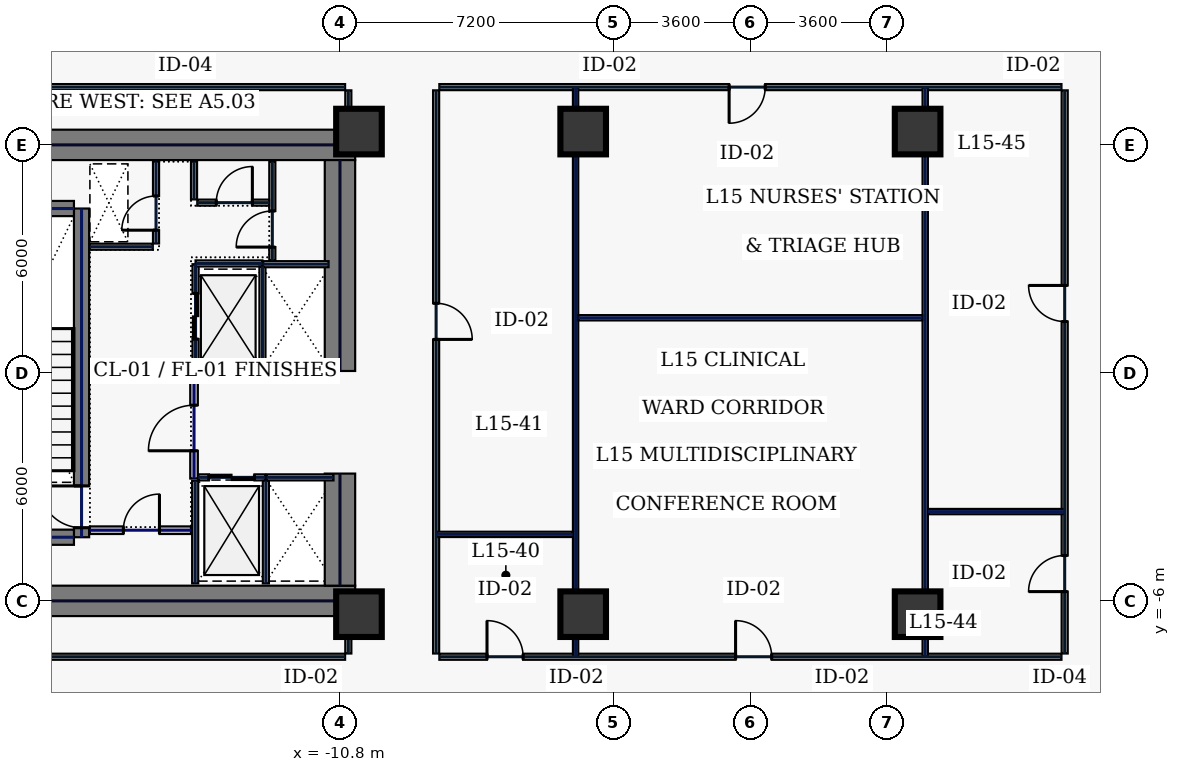
"""IFC4 building model, lengths in metres.
Left out: names, types, materials, properties, quantities, classifications, styles, units other than length and angle.
Written with IfcOpenShell. Run it as: python <this file> out.ifc"""

import sys

from ifc_helpers import new_model, si_unit, direction, frame, frame_2d, origin, origin_2d, place, context, subcontext, project, spatial, rectangle, hollow_rectangle, extrude, element, fill, save


model = new_model("IFC4")
c1 = context("Model", 3, precision=1e-05, world=origin(), true_north=direction((0.0, 1.0)))
c2 = subcontext(c1, "Body", "Model", "MODEL_VIEW")
j1 = project(units=[si_unit("LENGTHUNIT", "METRE"), si_unit("PLANEANGLEUNIT", "RADIAN")], contexts=[c1])
p1 = place(None, origin())
s1 = spatial("IfcSite", under=j1, at=p1, CompositionType="ELEMENT")
p2 = place(p1, origin())
s2 = spatial("IfcBuilding", under=s1, at=p2, CompositionType="ELEMENT")
p3 = place(p2, frame((0.0, 0.0, 71.4)))
s3 = spatial("IfcBuildingStorey", under=s2, at=p3, CompositionType="ELEMENT", Elevation=71.4)
for number, where, z_axis, x_axis in (
    (1, (-22.0, 6.0, 0.0), (0.0, 0.0, 1.0), (1.0, 0.0, 0.0)),
    (2, (-22.0, -6.0, 0.0), (0.0, 0.0, 1.0), (1.0, 0.0, 0.0)),
):
    element("IfcWall", number, at=place(p3, frame(where, z_axis=z_axis, x_axis=x_axis)), inside=s3, PredefinedType="SHEAR", context=c2, shape_type="SweptSolid", body=[
        extrude(rectangle(XDim=11.6, YDim=0.8, at=frame_2d((5.8, 0.0))), origin(), (0.0, 0.0, 1.0), 3.74),
    ])
p4 = place(p3, frame((-10.8, -5.6, 0.0), z_axis=(0.0, 0.0, 1.0), x_axis=(0.0, 1.0, 0.0)))
e3 = element("IfcWall", 3, at=p4, inside=s3, PredefinedType="SHEAR", context=c2, shape_type="SweptSolid", body=[
    extrude(rectangle(XDim=2.95, YDim=0.8, at=frame_2d((1.475, 0.0))), origin(), (0.0, 0.0, 1.0), 3.74),
])
p5 = place(p3, frame((-10.8, 0.05, 0.0), z_axis=(0.0, 0.0, 1.0), x_axis=(0.0, 1.0, 0.0)))
e4 = element("IfcWall", 4, at=p5, inside=s3, PredefinedType="SHEAR", context=c2, shape_type="SweptSolid", body=[
    extrude(rectangle(XDim=5.55, YDim=0.8, at=frame_2d((2.775, 0.0))), origin(), (0.0, 0.0, 1.0), 3.74),
])
p6 = place(p3, frame((-17.6, -4.325, 0.0), z_axis=(0.0, 0.0, 1.0), x_axis=(0.0, 1.0, 0.0)))
e5 = element("IfcWall", 5, at=p6, inside=s3, PredefinedType="SHEAR", context=c2, shape_type="SweptSolid", body=[
    extrude(rectangle(XDim=8.65, YDim=0.4, at=frame_2d((4.325, 0.0))), origin(), (0.0, 0.0, 1.0), 3.74),
])
p7 = place(p6, frame((0.25, 0.0, 0.0)))
e6 = element("IfcOpeningElement", 6, at=p7, cuts=e5, PredefinedType="OPENING", context=c2, shape_type="SweptSolid", body=[
    extrude(rectangle(XDim=1.1, YDim=2.2, at=frame_2d((0.55, 1.1))), frame((0.0, 0.21, 0.0), z_axis=(0.0, -1.0, 0.0), x_axis=(1.0, 0.0, 0.0)), (0.0, 0.0, 1.0), 0.42),
])
for number, where, z_axis, x_axis in (
    (7, (-21.2, -4.325, 0.0), (0.0, 0.0, 1.0), (1.0, 0.0, 0.0)),
    (8, (-21.2, 4.325, 0.0), (0.0, 0.0, 1.0), (1.0, 0.0, 0.0)),
):
    element("IfcWall", number, at=place(p3, frame(where, z_axis=z_axis, x_axis=x_axis)), inside=s3, PredefinedType="SHEAR", context=c2, shape_type="SweptSolid", body=[
        extrude(rectangle(XDim=3.4, YDim=0.4, at=frame_2d((1.7, 0.0))), origin(), (0.0, 0.0, 1.0), 3.74),
    ])
for number, where, z_axis, x_axis in (
    (9, (-10.3, -6.35, 0.0), (0.0, 0.0, 1.0), (1.0, 0.0, 0.0)),
    (10, (-10.3, 6.35, 0.0), (0.0, 0.0, 1.0), (1.0, 0.0, 0.0)),
    (11, (-4.4, -6.35, 0.0), (0.0, 0.0, 1.0), (1.0, 0.0, 0.0)),
    (12, (4.4, -6.35, 0.0), (0.0, 0.0, 1.0), (1.0, 0.0, 0.0)),
    (13, (-4.4, 6.35, 0.0), (0.0, 0.0, 1.0), (1.0, 0.0, 0.0)),
    (14, (4.4, 6.35, 0.0), (0.0, 0.0, 1.0), (1.0, 0.0, 0.0)),
):
    element("IfcColumn", number, at=place(p3, frame(where, z_axis=z_axis, x_axis=x_axis)), inside=s3, PredefinedType="COLUMN", context=c2, shape_type="SweptSolid", body=[
        extrude(hollow_rectangle(XDim=1.2, YDim=1.2, WallThickness=0.05, at=origin_2d()), origin(), (0.0, 0.0, 1.0), 3.74),
    ])
p8 = place(p3, frame((-14.6, 0.12, 0.0), z_axis=(0.0, 0.0, 1.0), x_axis=(0.0, 1.0, 0.0)))
e15 = element("IfcWall", 15, at=p8, inside=s3, PredefinedType="PARTITIONING", context=c2, shape_type="SweptSolid", body=[
    extrude(rectangle(XDim=2.74, YDim=0.16, at=frame_2d((1.37, 0.0))), origin(), (0.0, 0.0, 1.0), 3.74),
])
p9 = place(p8, frame((0.77, 0.0, 0.0)))
e16 = element("IfcOpeningElement", 16, at=p9, cuts=e15, PredefinedType="OPENING", context=c2, shape_type="SweptSolid", body=[
    extrude(rectangle(XDim=1.2, YDim=2.2, at=frame_2d((0.6, 1.1))), frame((0.0, 0.09, 0.0), z_axis=(0.0, -1.0, 0.0), x_axis=(1.0, 0.0, 0.0)), (0.0, 0.0, 1.0), 0.18),
])
for number, where, z_axis, x_axis in (
    (17, (-14.6, 0.1, 0.0), (0.0, 0.0, 1.0), (1.0, 0.0, 0.0)),
    (18, (-14.6, 2.88, 0.0), (0.0, 0.0, 1.0), (1.0, 0.0, 0.0)),
):
    element("IfcWall", number, at=place(p3, frame(where, z_axis=z_axis, x_axis=x_axis)), inside=s3, PredefinedType="PARTITIONING", context=c2, shape_type="SweptSolid", body=[
        extrude(rectangle(XDim=1.76, YDim=0.16, at=frame_2d((0.88, 0.0))), origin(), (0.0, 0.0, 1.0), 3.74),
    ])
p10 = place(p3, frame((-12.84, 0.18, 0.0), z_axis=(0.0, 0.0, 1.0), x_axis=(0.0, 1.0, 0.0)))
e19 = element("IfcWall", 19, at=p10, inside=s3, PredefinedType="PARTITIONING", context=c2, shape_type="SweptSolid", body=[
    extrude(rectangle(XDim=2.62, YDim=0.16, at=frame_2d((1.31, 0.0))), origin(), (0.0, 0.0, 1.0), 3.74),
])
p11 = place(p3, frame((-14.53, -2.75, 0.0), z_axis=(0.0, 0.0, 1.0), x_axis=(1.0, 0.0, 0.0)))
e20 = element("IfcWall", 20, at=p11, inside=s3, PredefinedType="PARTITIONING", context=c2, shape_type="SweptSolid", body=[
    extrude(rectangle(XDim=1.76, YDim=0.16, at=frame_2d((0.88, 0.0))), origin(), (0.0, 0.0, 1.0), 3.74),
])
p12 = place(p11, frame((0.28, 0.0, 0.0)))
e21 = element("IfcOpeningElement", 21, at=p12, cuts=e20, PredefinedType="OPENING", context=c2, shape_type="SweptSolid", body=[
    extrude(rectangle(XDim=1.2, YDim=2.2, at=frame_2d((0.6, 1.1))), frame((0.0, 0.09, 0.0), z_axis=(0.0, -1.0, 0.0), x_axis=(1.0, 0.0, 0.0)), (0.0, 0.0, 1.0), 0.18),
])
for number, where, z_axis, x_axis in (
    (22, (-12.75, -5.54, 0.0), (0.0, 0.0, 1.0), (0.0, 1.0, 0.0)),
    (23, (-14.61, -5.54, 0.0), (0.0, 0.0, 1.0), (0.0, 1.0, 0.0)),
):
    element("IfcWall", number, at=place(p3, frame(where, z_axis=z_axis, x_axis=x_axis)), inside=s3, PredefinedType="PARTITIONING", context=c2, shape_type="SweptSolid", body=[
        extrude(rectangle(XDim=2.7, YDim=0.16, at=frame_2d((1.35, 0.0))), origin(), (0.0, 0.0, 1.0), 3.74),
    ])
p13 = place(p3, frame((-12.73, -2.75, 0.0), z_axis=(0.0, 0.0, 1.0), x_axis=(1.0, 0.0, 0.0)))
e24 = element("IfcWall", 24, at=p13, inside=s3, PredefinedType="PARTITIONING", context=c2, shape_type="SweptSolid", body=[
    extrude(rectangle(XDim=1.76, YDim=0.16, at=frame_2d((0.88, 0.0))), origin(), (0.0, 0.0, 1.0), 3.74),
])
for number, where, z_axis, x_axis in (
    (25, (-12.82, 0.06, 0.0), (0.0, 0.0, 1.0), (1.0, 0.0, 0.0)),
    (26, (-12.82, 2.86, 0.0), (0.0, 0.0, 1.0), (1.0, 0.0, 0.0)),
):
    element("IfcWall", number, at=place(p3, frame(where, z_axis=z_axis, x_axis=x_axis)), inside=s3, PredefinedType="PARTITIONING", context=c2, shape_type="SweptSolid", body=[
        extrude(rectangle(XDim=1.72, YDim=0.16, at=frame_2d((0.86, 0.0))), origin(), (0.0, 0.0, 1.0), 3.74),
    ])
p14 = place(p3, frame((-15.64, 3.405, 0.0), z_axis=(0.0, 0.0, 1.0), x_axis=(0.0, 1.0, 0.0)))
e27 = element("IfcWall", 27, at=p14, inside=s3, PredefinedType="PARTITIONING", context=c2, shape_type="SweptSolid", body=[
    extrude(rectangle(XDim=2.155, YDim=0.16, at=frame_2d((1.078, 0.0))), origin(), (0.0, 0.0, 1.0), 3.74),
])
p15 = place(p14, frame((0.35, 0.0, 0.0)))
e28 = element("IfcOpeningElement", 28, at=p15, cuts=e27, PredefinedType="OPENING", context=c2, shape_type="SweptSolid", body=[
    extrude(rectangle(XDim=0.9, YDim=2.2, at=frame_2d((0.45, 1.1))), frame((0.0, 0.09, 0.0), z_axis=(0.0, -1.0, 0.0), x_axis=(1.0, 0.0, 0.0)), (0.0, 0.0, 1.0), 0.18),
])
p16 = place(p3, frame((-17.38, 3.32, 0.0), z_axis=(0.0, 0.0, 1.0), x_axis=(1.0, 0.0, 0.0)))
e29 = element("IfcWall", 29, at=p16, inside=s3, PredefinedType="PARTITIONING", context=c2, shape_type="SweptSolid", body=[
    extrude(rectangle(XDim=1.655, YDim=0.16, at=frame_2d((0.827, 0.0))), origin(), (0.0, 0.0, 1.0), 3.74),
])
p17 = place(p3, frame((-17.38, -4.14, 0.0), z_axis=(0.0, 0.0, 1.0), x_axis=(1.0, 0.0, 0.0)))
e30 = element("IfcWall", 30, at=p17, inside=s3, PredefinedType="SOLIDWALL", context=c2, shape_type="SweptSolid", body=[
    extrude(rectangle(XDim=2.66, YDim=0.2, at=frame_2d((1.33, 0.0))), origin(), (0.0, 0.0, 1.0), 3.74),
])
p18 = place(p17, frame((0.88, 0.0, 0.0)))
e31 = element("IfcOpeningElement", 31, at=p18, cuts=e30, PredefinedType="OPENING", context=c2, shape_type="SweptSolid", body=[
    extrude(rectangle(XDim=0.95, YDim=2.2, at=frame_2d((0.475, 1.1))), frame((0.0, 0.11, 0.0), z_axis=(0.0, -1.0, 0.0), x_axis=(1.0, 0.0, 0.0)), (0.0, 0.0, 1.0), 0.22),
])
p19 = place(p3, frame((-12.58, 2.96, 0.0), z_axis=(0.0, 0.0, 1.0), x_axis=(0.0, 1.0, 0.0)))
e32 = element("IfcWall", 32, at=p19, inside=s3, PredefinedType="PARTITIONING", context=c2, shape_type="SweptSolid", body=[
    extrude(rectangle(XDim=2.6, YDim=0.16, at=frame_2d((1.3, 0.0))), origin(), (0.0, 0.0, 1.0), 3.74),
])
p20 = place(p19, frame((0.35, 0.0, 0.0)))
e33 = element("IfcOpeningElement", 33, at=p20, cuts=e32, PredefinedType="OPENING", context=c2, shape_type="SweptSolid", body=[
    extrude(rectangle(XDim=0.95, YDim=2.2, at=frame_2d((0.475, 1.1))), frame((0.0, 0.09, 0.0), z_axis=(0.0, -1.0, 0.0), x_axis=(1.0, 0.0, 0.0)), (0.0, 0.0, 1.0), 0.18),
])
p21 = place(p3, frame((-14.555, 4.48, 0.0), z_axis=(0.0, 0.0, 1.0), x_axis=(1.0, 0.0, 0.0)))
e34 = element("IfcWall", 34, at=p21, inside=s3, PredefinedType="PARTITIONING", context=c2, shape_type="SweptSolid", body=[
    extrude(rectangle(XDim=1.89, YDim=0.16, at=frame_2d((0.945, 0.0))), origin(), (0.0, 0.0, 1.0), 3.74),
])
p22 = place(p21, frame((0.5, 0.0, 0.0)))
e35 = element("IfcOpeningElement", 35, at=p22, cuts=e34, PredefinedType="OPENING", context=c2, shape_type="SweptSolid", body=[
    extrude(rectangle(XDim=0.95, YDim=2.2, at=frame_2d((0.475, 1.1))), frame((0.0, 0.09, 0.0), z_axis=(0.0, -1.0, 0.0), x_axis=(1.0, 0.0, 0.0)), (0.0, 0.0, 1.0), 0.18),
])
p23 = place(p3, frame((-14.64, 4.565, 0.0), z_axis=(0.0, 0.0, 1.0), x_axis=(0.0, 1.0, 0.0)))
e36 = element("IfcWall", 36, at=p23, inside=s3, PredefinedType="PARTITIONING", context=c2, shape_type="SweptSolid", body=[
    extrude(rectangle(XDim=0.995, YDim=0.16, at=frame_2d((0.498, 0.0))), origin(), (0.0, 0.0, 1.0), 3.74),
])
p24 = place(p3, frame((-14.64, -2.78, 0.0), z_axis=(0.0, 0.0, 1.0), x_axis=(0.0, 1.0, 0.0)))
e37 = element("IfcWall", 37, at=p24, inside=s3, PredefinedType="SOLIDWALL", context=c2, shape_type="SweptSolid", body=[
    extrude(rectangle(XDim=2.82, YDim=0.2, at=frame_2d((1.41, 0.0))), origin(), (0.0, 0.0, 1.0), 3.74),
])
p25 = place(p24, frame((0.73, 0.0, 0.0)))
e38 = element("IfcOpeningElement", 38, at=p25, cuts=e37, PredefinedType="OPENING", context=c2, shape_type="SweptSolid", body=[
    extrude(rectangle(XDim=1.2, YDim=2.2, at=frame_2d((0.6, 1.1))), frame((0.0, 0.11, 0.0), z_axis=(0.0, -1.0, 0.0), x_axis=(1.0, 0.0, 0.0)), (0.0, 0.0, 1.0), 0.22),
])
p26 = place(p3, frame((8.185, 7.52, 0.0), z_axis=(0.0, 0.0, 1.0), x_axis=(-1.0, 0.0, 0.0)))
e39 = element("IfcWall", 39, at=p26, inside=s3, PredefinedType="PARTITIONING", context=c2, shape_type="SweptSolid", body=[
    extrude(rectangle(XDim=16.37, YDim=0.16, at=frame_2d((8.185, 0.0))), origin(), (0.0, 0.0, 1.0), 3.74),
])
p27 = place(p26, frame((7.795, 0.0, 0.0)))
e40 = element("IfcOpeningElement", 40, at=p27, cuts=e39, PredefinedType="OPENING", context=c2, shape_type="SweptSolid", body=[
    extrude(rectangle(XDim=0.95, YDim=2.2, at=frame_2d((0.475, 1.1))), frame((0.0, 0.09, 0.0), z_axis=(0.0, -1.0, 0.0), x_axis=(1.0, 0.0, 0.0)), (0.0, 0.0, 1.0), 0.18),
])
p28 = place(p3, frame((-8.27, 7.435, 0.0), z_axis=(0.0, 0.0, 1.0), x_axis=(0.0, -1.0, 0.0)))
e41 = element("IfcWall", 41, at=p28, inside=s3, PredefinedType="PARTITIONING", context=c2, shape_type="SweptSolid", body=[
    extrude(rectangle(XDim=14.82, YDim=0.16, at=frame_2d((7.41, 0.0))), origin(), (0.0, 0.0, 1.0), 3.74),
])
p29 = place(p28, frame((5.604, 0.0, 0.0)))
e42 = element("IfcOpeningElement", 42, at=p29, cuts=e41, PredefinedType="OPENING", context=c2, shape_type="SweptSolid", body=[
    extrude(rectangle(XDim=0.95, YDim=2.2, at=frame_2d((0.475, 1.1))), frame((0.0, 0.09, 0.0), z_axis=(0.0, -1.0, 0.0), x_axis=(1.0, 0.0, 0.0)), (0.0, 0.0, 1.0), 0.18),
])
p30 = place(p3, frame((-8.185, -7.47, 0.0), z_axis=(0.0, 0.0, 1.0), x_axis=(1.0, 0.0, 0.0)))
e43 = element("IfcWall", 43, at=p30, inside=s3, PredefinedType="PARTITIONING", context=c2, shape_type="SweptSolid", body=[
    extrude(rectangle(XDim=16.37, YDim=0.16, at=frame_2d((8.185, 0.0))), origin(), (0.0, 0.0, 1.0), 3.74),
])
p31 = place(p30, frame((1.254, 0.0, 0.0)))
e44 = element("IfcOpeningElement", 44, at=p31, cuts=e43, PredefinedType="OPENING", context=c2, shape_type="SweptSolid", body=[
    extrude(rectangle(XDim=0.95, YDim=2.2, at=frame_2d((0.475, 1.1))), frame((0.0, 0.09, 0.0), z_axis=(0.0, -1.0, 0.0), x_axis=(1.0, 0.0, 0.0)), (0.0, 0.0, 1.0), 0.18),
])
p32 = place(p30, frame((7.795, 0.0, 0.0)))
e45 = element("IfcOpeningElement", 45, at=p32, cuts=e43, PredefinedType="OPENING", context=c2, shape_type="SweptSolid", body=[
    extrude(rectangle(XDim=0.95, YDim=2.2, at=frame_2d((0.475, 1.1))), frame((0.0, 0.09, 0.0), z_axis=(0.0, -1.0, 0.0), x_axis=(1.0, 0.0, 0.0)), (0.0, 0.0, 1.0), 0.18),
])
p33 = place(p3, frame((8.27, -7.385, 0.0), z_axis=(0.0, 0.0, 1.0), x_axis=(0.0, 1.0, 0.0)))
e46 = element("IfcWall", 46, at=p33, inside=s3, PredefinedType="PARTITIONING", context=c2, shape_type="SweptSolid", body=[
    extrude(rectangle(XDim=14.82, YDim=0.16, at=frame_2d((7.41, 0.0))), origin(), (0.0, 0.0, 1.0), 3.74),
])
p34 = place(p33, frame((1.629, 0.0, 0.0)))
e47 = element("IfcOpeningElement", 47, at=p34, cuts=e46, PredefinedType="OPENING", context=c2, shape_type="SweptSolid", body=[
    extrude(rectangle(XDim=0.95, YDim=2.2, at=frame_2d((0.475, 1.1))), frame((0.0, 0.09, 0.0), z_axis=(0.0, -1.0, 0.0), x_axis=(1.0, 0.0, 0.0)), (0.0, 0.0, 1.0), 0.18),
])
p35 = place(p33, frame((8.736, 0.0, 0.0)))
e48 = element("IfcOpeningElement", 48, at=p35, cuts=e46, PredefinedType="OPENING", context=c2, shape_type="SweptSolid", body=[
    extrude(rectangle(XDim=0.95, YDim=2.2, at=frame_2d((0.475, 1.1))), frame((0.0, 0.09, 0.0), z_axis=(0.0, -1.0, 0.0), x_axis=(1.0, 0.0, 0.0)), (0.0, 0.0, 1.0), 0.18),
])
p36 = place(p3, frame((-10.58, -7.385, 0.0), z_axis=(0.0, 0.0, 1.0), x_axis=(0.0, 1.0, 0.0)))
e49 = element("IfcWall", 49, at=p36, inside=s3, PredefinedType="PARTITIONING", context=c2, shape_type="SweptSolid", body=[
    extrude(rectangle(XDim=0.965, YDim=0.16, at=frame_2d((0.482, 0.0))), origin(), (0.0, 0.0, 1.0), 3.74),
])
p37 = place(p3, frame((-10.58, 6.42, 0.0), z_axis=(0.0, 0.0, 1.0), x_axis=(0.0, 1.0, 0.0)))
e50 = element("IfcWall", 50, at=p37, inside=s3, PredefinedType="PARTITIONING", context=c2, shape_type="SweptSolid", body=[
    extrude(rectangle(XDim=1.015, YDim=0.16, at=frame_2d((0.508, 0.0))), origin(), (0.0, 0.0, 1.0), 3.74),
])
for number, where, z_axis, x_axis in (
    (51, (-10.665, 7.52, 0.0), (0.0, 0.0, 1.0), (-1.0, 0.0, 0.0)),
    (52, (-27.185, -7.47, 0.0), (0.0, 0.0, 1.0), (1.0, 0.0, 0.0)),
):
    element("IfcWall", number, at=place(p3, frame(where, z_axis=z_axis, x_axis=x_axis)), inside=s3, PredefinedType="PARTITIONING", context=c2, shape_type="SweptSolid", body=[
        extrude(rectangle(XDim=16.52, YDim=0.16, at=frame_2d((8.26, 0.0))), origin(), (0.0, 0.0, 1.0), 3.74),
    ])
for number, where, z_axis, x_axis in (
    (53, (-4.6, -7.465, 0.0), (0.0, 0.0, 1.0), (0.0, 1.0, 0.0)),
    (54, (4.6, -7.465, 0.0), (0.0, 0.0, 1.0), (0.0, 1.0, 0.0)),
):
    element("IfcWall", number, at=place(p3, frame(where, z_axis=z_axis, x_axis=x_axis)), inside=s3, PredefinedType="PARTITIONING", context=c2, shape_type="SweptSolid", body=[
        extrude(rectangle(XDim=14.98, YDim=0.14, at=frame_2d((7.49, 0.0))), origin(), (0.0, 0.0, 1.0), 2.935),
    ])
p38 = place(p3, frame((-4.525, 1.45, 0.0), z_axis=(0.0, 0.0, 1.0), x_axis=(1.0, 0.0, 0.0)))
e55 = element("IfcWall", 55, at=p38, inside=s3, PredefinedType="PARTITIONING", context=c2, shape_type="SweptSolid", body=[
    extrude(rectangle(XDim=9.05, YDim=0.14, at=frame_2d((4.525, 0.0))), origin(), (0.0, 0.0, 1.0), 3.74),
])
for number, where, z_axis, x_axis in (
    (56, (-8.265, -4.25, 0.0), (0.0, 0.0, 1.0), (1.0, 0.0, 0.0)),
    (57, (4.675, -3.65, 0.0), (0.0, 0.0, 1.0), (1.0, 0.0, 0.0)),
):
    element("IfcWall", number, at=place(p3, frame(where, z_axis=z_axis, x_axis=x_axis)), inside=s3, PredefinedType="PARTITIONING", context=c2, shape_type="SweptSolid", body=[
        extrude(rectangle(XDim=3.59, YDim=0.14, at=frame_2d((1.795, 0.0))), origin(), (0.0, 0.0, 1.0), 3.74),
    ])
p39 = place(p7, origin())
e58 = element("IfcDoor", 58, at=p39, inside=s3, OperationType="SINGLE_SWING_RIGHT", PredefinedType="DOOR", context=c2, shape_type="SweptSolid", body=[
    extrude(rectangle(XDim=1.1, YDim=2.2, at=frame_2d((0.55, 1.1))), frame((0.0, 0.025, 0.0), z_axis=(0.0, -1.0, 0.0), x_axis=(1.0, 0.0, 0.0)), (0.0, 0.0, 1.0), 0.05),
])
fill(e6, e58)
p40 = place(p9, origin())
e59 = element("IfcDoor", 59, at=p40, inside=s3, OperationType="SLIDING_TO_LEFT", PredefinedType="DOOR", context=c2, shape_type="SweptSolid", body=[
    extrude(rectangle(XDim=1.2, YDim=2.2, at=frame_2d((0.6, 1.1))), frame((0.0, 0.025, 0.0), z_axis=(0.0, -1.0, 0.0), x_axis=(1.0, 0.0, 0.0)), (0.0, 0.0, 1.0), 0.05),
])
fill(e16, e59)
p41 = place(p12, origin())
e60 = element("IfcDoor", 60, at=p41, inside=s3, OperationType="SLIDING_TO_LEFT", PredefinedType="DOOR", context=c2, shape_type="SweptSolid", body=[
    extrude(rectangle(XDim=1.2, YDim=2.2, at=frame_2d((0.6, 1.1))), frame((0.0, 0.025, 0.0), z_axis=(0.0, -1.0, 0.0), x_axis=(1.0, 0.0, 0.0)), (0.0, 0.0, 1.0), 0.05),
])
fill(e21, e60)
p42 = place(p15, origin())
e61 = element("IfcDoor", 61, at=p42, inside=s3, OperationType="SINGLE_SWING_LEFT", PredefinedType="DOOR", context=c2, shape_type="SweptSolid", body=[
    extrude(rectangle(XDim=0.9, YDim=2.2, at=frame_2d((0.45, 1.1))), frame((0.0, 0.025, 0.0), z_axis=(0.0, -1.0, 0.0), x_axis=(1.0, 0.0, 0.0)), (0.0, 0.0, 1.0), 0.05),
])
fill(e28, e61)
p43 = place(p18, origin())
e62 = element("IfcDoor", 62, at=p43, inside=s3, OperationType="SINGLE_SWING_RIGHT", PredefinedType="DOOR", context=c2, shape_type="SweptSolid", body=[
    extrude(rectangle(XDim=0.95, YDim=2.2, at=frame_2d((0.475, 1.1))), frame((0.0, 0.025, 0.0), z_axis=(0.0, -1.0, 0.0), x_axis=(1.0, 0.0, 0.0)), (0.0, 0.0, 1.0), 0.05),
])
fill(e31, e62)
p44 = place(p20, origin())
e63 = element("IfcDoor", 63, at=p44, inside=s3, OperationType="SINGLE_SWING_LEFT", PredefinedType="DOOR", context=c2, shape_type="SweptSolid", body=[
    extrude(rectangle(XDim=0.95, YDim=2.2, at=frame_2d((0.475, 1.1))), frame((0.0, 0.025, 0.0), z_axis=(0.0, -1.0, 0.0), x_axis=(1.0, 0.0, 0.0)), (0.0, 0.0, 1.0), 0.05),
])
fill(e33, e63)
p45 = place(p22, origin())
e64 = element("IfcDoor", 64, at=p45, inside=s3, OperationType="SINGLE_SWING_RIGHT", PredefinedType="DOOR", context=c2, shape_type="SweptSolid", body=[
    extrude(rectangle(XDim=0.95, YDim=2.2, at=frame_2d((0.475, 1.1))), frame((0.0, 0.025, 0.0), z_axis=(0.0, -1.0, 0.0), x_axis=(1.0, 0.0, 0.0)), (0.0, 0.0, 1.0), 0.05),
])
fill(e35, e64)
p46 = place(p25, origin())
e65 = element("IfcDoor", 65, at=p46, inside=s3, OperationType="SINGLE_SWING_LEFT", PredefinedType="DOOR", context=c2, shape_type="SweptSolid", body=[
    extrude(rectangle(XDim=1.2, YDim=2.2, at=frame_2d((0.6, 1.1))), frame((0.0, 0.025, 0.0), z_axis=(0.0, -1.0, 0.0), x_axis=(1.0, 0.0, 0.0)), (0.0, 0.0, 1.0), 0.05),
])
fill(e38, e65)
p47 = place(p31, origin())
e66 = element("IfcDoor", 66, at=p47, inside=s3, OperationType="SINGLE_SWING_LEFT", PredefinedType="DOOR", context=c2, shape_type="SweptSolid", body=[
    extrude(rectangle(XDim=0.95, YDim=2.2, at=frame_2d((0.475, 1.1))), frame((0.0, 0.025, 0.0), z_axis=(0.0, -1.0, 0.0), x_axis=(1.0, 0.0, 0.0)), (0.0, 0.0, 1.0), 0.05),
])
fill(e44, e66)
p48 = place(p29, origin())
e67 = element("IfcDoor", 67, at=p48, inside=s3, OperationType="SINGLE_SWING_RIGHT", PredefinedType="DOOR", context=c2, shape_type="SweptSolid", body=[
    extrude(rectangle(XDim=0.95, YDim=2.2, at=frame_2d((0.475, 1.1))), frame((0.0, 0.025, 0.0), z_axis=(0.0, -1.0, 0.0), x_axis=(1.0, 0.0, 0.0)), (0.0, 0.0, 1.0), 0.05),
])
fill(e42, e67)
p49 = place(p32, origin())
e68 = element("IfcDoor", 68, at=p49, inside=s3, OperationType="SINGLE_SWING_LEFT", PredefinedType="DOOR", context=c2, shape_type="SweptSolid", body=[
    extrude(rectangle(XDim=0.95, YDim=2.2, at=frame_2d((0.475, 1.1))), frame((0.0, 0.025, 0.0), z_axis=(0.0, -1.0, 0.0), x_axis=(1.0, 0.0, 0.0)), (0.0, 0.0, 1.0), 0.05),
])
fill(e45, e68)
p50 = place(p27, origin())
e69 = element("IfcDoor", 69, at=p50, inside=s3, OperationType="SINGLE_SWING_RIGHT", PredefinedType="DOOR", context=c2, shape_type="SweptSolid", body=[
    extrude(rectangle(XDim=0.95, YDim=2.2, at=frame_2d((0.475, 1.1))), frame((0.0, 0.025, 0.0), z_axis=(0.0, -1.0, 0.0), x_axis=(1.0, 0.0, 0.0)), (0.0, 0.0, 1.0), 0.05),
])
fill(e40, e69)
p51 = place(p34, origin())
e70 = element("IfcDoor", 70, at=p51, inside=s3, OperationType="SINGLE_SWING_LEFT", PredefinedType="DOOR", context=c2, shape_type="SweptSolid", body=[
    extrude(rectangle(XDim=0.95, YDim=2.2, at=frame_2d((0.475, 1.1))), frame((0.0, 0.025, 0.0), z_axis=(0.0, -1.0, 0.0), x_axis=(1.0, 0.0, 0.0)), (0.0, 0.0, 1.0), 0.05),
])
fill(e47, e70)
p52 = place(p35, origin())
e71 = element("IfcDoor", 71, at=p52, inside=s3, OperationType="SINGLE_SWING_RIGHT", PredefinedType="DOOR", context=c2, shape_type="SweptSolid", body=[
    extrude(rectangle(XDim=0.95, YDim=2.2, at=frame_2d((0.475, 1.1))), frame((0.0, 0.025, 0.0), z_axis=(0.0, -1.0, 0.0), x_axis=(1.0, 0.0, 0.0)), (0.0, 0.0, 1.0), 0.05),
])
fill(e48, e71)
save(model, sys.argv[1])
